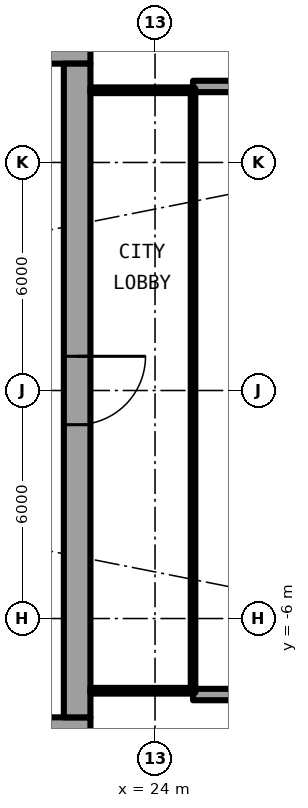
"""IFC4 building model, lengths in metres.
Left out: names, types, materials, properties, quantities, classifications, styles, units other than length and angle.
Written with IfcOpenShell. Run it as: python <this file> out.ifc"""

import sys

from ifc_helpers import new_model, si_unit, direction, frame, frame_2d, origin, place, context, subcontext, project, spatial, rectangle, extrude, element, fill, save


model = new_model("IFC4")
c1 = context("Model", 3, precision=1e-05, world=origin(), true_north=direction((0.0, 1.0)))
c2 = subcontext(c1, "Body", "Model", "MODEL_VIEW")
j1 = project(units=[si_unit("LENGTHUNIT", "METRE"), si_unit("PLANEANGLEUNIT", "RADIAN")], contexts=[c1])
p1 = place(None, origin())
s1 = spatial("IfcSite", under=j1, at=p1, CompositionType="ELEMENT")
p2 = place(p1, origin())
s2 = spatial("IfcBuilding", under=s1, at=p2, CompositionType="ELEMENT")
p3 = place(p2, frame((0.0, 0.0, 75.8)))
s3 = spatial("IfcBuildingStorey", under=s2, at=p3, CompositionType="ELEMENT", Elevation=75.8)
for number, where, z_axis, x_axis in (
    (1, (25.0, 8.0, 0.0), (0.0, 0.0, 1.0), (1.0, 0.0, 0.0)),
    (2, (25.0, -8.0, 0.0), (0.0, 0.0, 1.0), (1.0, 0.0, 0.0)),
):
    element("IfcWall", number, at=place(p3, frame(where, z_axis=z_axis, x_axis=x_axis)), inside=s3, PredefinedType="SOLIDWALL", context=c2, shape_type="SweptSolid", body=[
        extrude(rectangle(XDim=2.667, YDim=0.3, at=frame_2d((1.333, 0.0))), origin(), (0.0, 0.0, 1.0), 2.7),
    ])
p4 = place(p3, frame((22.3, 8.95, 0.0), z_axis=(0.0, 0.0, 1.0), x_axis=(-1.0, 0.0, 0.0)))
e3 = element("IfcWall", 3, at=p4, inside=s3, PredefinedType="SHEAR", context=c2, shape_type="SweptSolid", body=[
    extrude(rectangle(XDim=14.0, YDim=0.7, at=frame_2d((7.0, 0.0))), origin(), (0.0, 0.0, 1.0), 3.05),
])
p5 = place(p4, frame((1.225, 0.0, 0.0)))
e4 = element("IfcOpeningElement", 4, at=p5, cuts=e3, PredefinedType="OPENING", context=c2, shape_type="SweptSolid", body=[
    extrude(rectangle(XDim=1.2, YDim=2.3, at=frame_2d((0.6, 1.15))), frame((0.0, 0.36, 0.0), z_axis=(0.0, -1.0, 0.0), x_axis=(1.0, 0.0, 0.0)), (0.0, 0.0, 1.0), 0.72),
])
p6 = place(p3, frame((8.3, -8.95, 0.0), z_axis=(0.0, 0.0, 1.0), x_axis=(1.0, 0.0, 0.0)))
e5 = element("IfcWall", 5, at=p6, inside=s3, PredefinedType="SHEAR", context=c2, shape_type="SweptSolid", body=[
    extrude(rectangle(XDim=14.0, YDim=0.7, at=frame_2d((7.0, 0.0))), origin(), (0.0, 0.0, 1.0), 3.05),
])
p7 = place(p6, frame((11.575, 0.0, 0.0)))
e6 = element("IfcOpeningElement", 6, at=p7, cuts=e5, PredefinedType="OPENING", context=c2, shape_type="SweptSolid", body=[
    extrude(rectangle(XDim=1.2, YDim=2.3, at=frame_2d((0.6, 1.15))), frame((0.0, 0.36, 0.0), z_axis=(0.0, -1.0, 0.0), x_axis=(1.0, 0.0, 0.0)), (0.0, 0.0, 1.0), 0.72),
])
p8 = place(p3, frame((21.95, 8.6, 0.0), z_axis=(0.0, 0.0, 1.0), x_axis=(0.0, -1.0, 0.0)))
e7 = element("IfcWall", 7, at=p8, inside=s3, PredefinedType="SHEAR", context=c2, shape_type="SweptSolid", body=[
    extrude(rectangle(XDim=17.2, YDim=0.7, at=frame_2d((8.6, 0.0))), origin(), (0.0, 0.0, 1.0), 3.05),
])
p9 = place(p8, frame((7.7, 0.0, 0.0)))
e8 = element("IfcOpeningElement", 8, at=p9, cuts=e7, PredefinedType="OPENING", context=c2, shape_type="SweptSolid", body=[
    extrude(rectangle(XDim=1.8, YDim=2.3, at=frame_2d((0.9, 1.15))), frame((0.0, 0.36, 0.0), z_axis=(0.0, -1.0, 0.0), x_axis=(1.0, 0.0, 0.0)), (0.0, 0.0, 1.0), 0.72),
])
for number, where, z_axis, x_axis in (
    (9, (22.3, -7.9, 0.0), (0.0, 0.0, 1.0), (1.0, 0.0, 0.0)),
    (10, (22.3, 7.9, 0.0), (0.0, 0.0, 1.0), (1.0, 0.0, 0.0)),
):
    element("IfcWall", number, at=place(p3, frame(where, z_axis=z_axis, x_axis=x_axis)), inside=s3, PredefinedType="PARTITIONING", context=c2, shape_type="SweptSolid", body=[
        extrude(rectangle(XDim=2.64, YDim=0.15, at=frame_2d((1.32, 0.0))), origin(), (0.0, 0.0, 1.0), 2.7),
    ])
p10 = place(p3, frame((25.0, -7.95, 0.0), z_axis=(0.0, 0.0, 1.0), x_axis=(0.0, 1.0, 0.0)))
e11 = element("IfcWall", 11, at=p10, inside=s3, PredefinedType="PARTITIONING", context=c2, shape_type="SweptSolid", body=[
    extrude(rectangle(XDim=15.9, YDim=0.12, at=frame_2d((7.95, 0.0))), origin(), (0.0, 0.0, 1.0), 2.7),
])
p11 = place(p10, frame((0.95, 0.0, 0.1)))
e12 = element("IfcOpeningElement", 12, at=p11, cuts=e11, PredefinedType="OPENING", context=c2, shape_type="SweptSolid", body=[
    extrude(rectangle(XDim=14.0, YDim=2.35, at=frame_2d((7.0, 1.175))), frame((0.0, 0.07, 0.0), z_axis=(0.0, -1.0, 0.0), x_axis=(1.0, 0.0, 0.0)), (0.0, 0.0, 1.0), 0.14),
])
p12 = place(p9, origin())
e13 = element("IfcDoor", 13, at=p12, inside=s3, OperationType="SINGLE_SWING_LEFT", PredefinedType="DOOR", context=c2, shape_type="SweptSolid", body=[
    extrude(rectangle(XDim=1.8, YDim=2.3, at=frame_2d((0.9, 1.15))), frame((0.0, 0.025, 0.0), z_axis=(0.0, -1.0, 0.0), x_axis=(1.0, 0.0, 0.0)), (0.0, 0.0, 1.0), 0.05),
])
fill(e8, e13)
p13 = place(p11, origin())
e14 = element("IfcWindow", 14, at=p13, inside=s3, PartitioningType="SINGLE_PANEL", PredefinedType="WINDOW", context=c2, shape_type="SweptSolid", body=[
    extrude(rectangle(XDim=14.0, YDim=2.35, at=frame_2d((7.0, 1.175))), frame((0.0, 0.03, 0.0), z_axis=(0.0, -1.0, 0.0), x_axis=(1.0, 0.0, 0.0)), (0.0, 0.0, 1.0), 0.06),
])
fill(e12, e14)
save(model, sys.argv[1])
